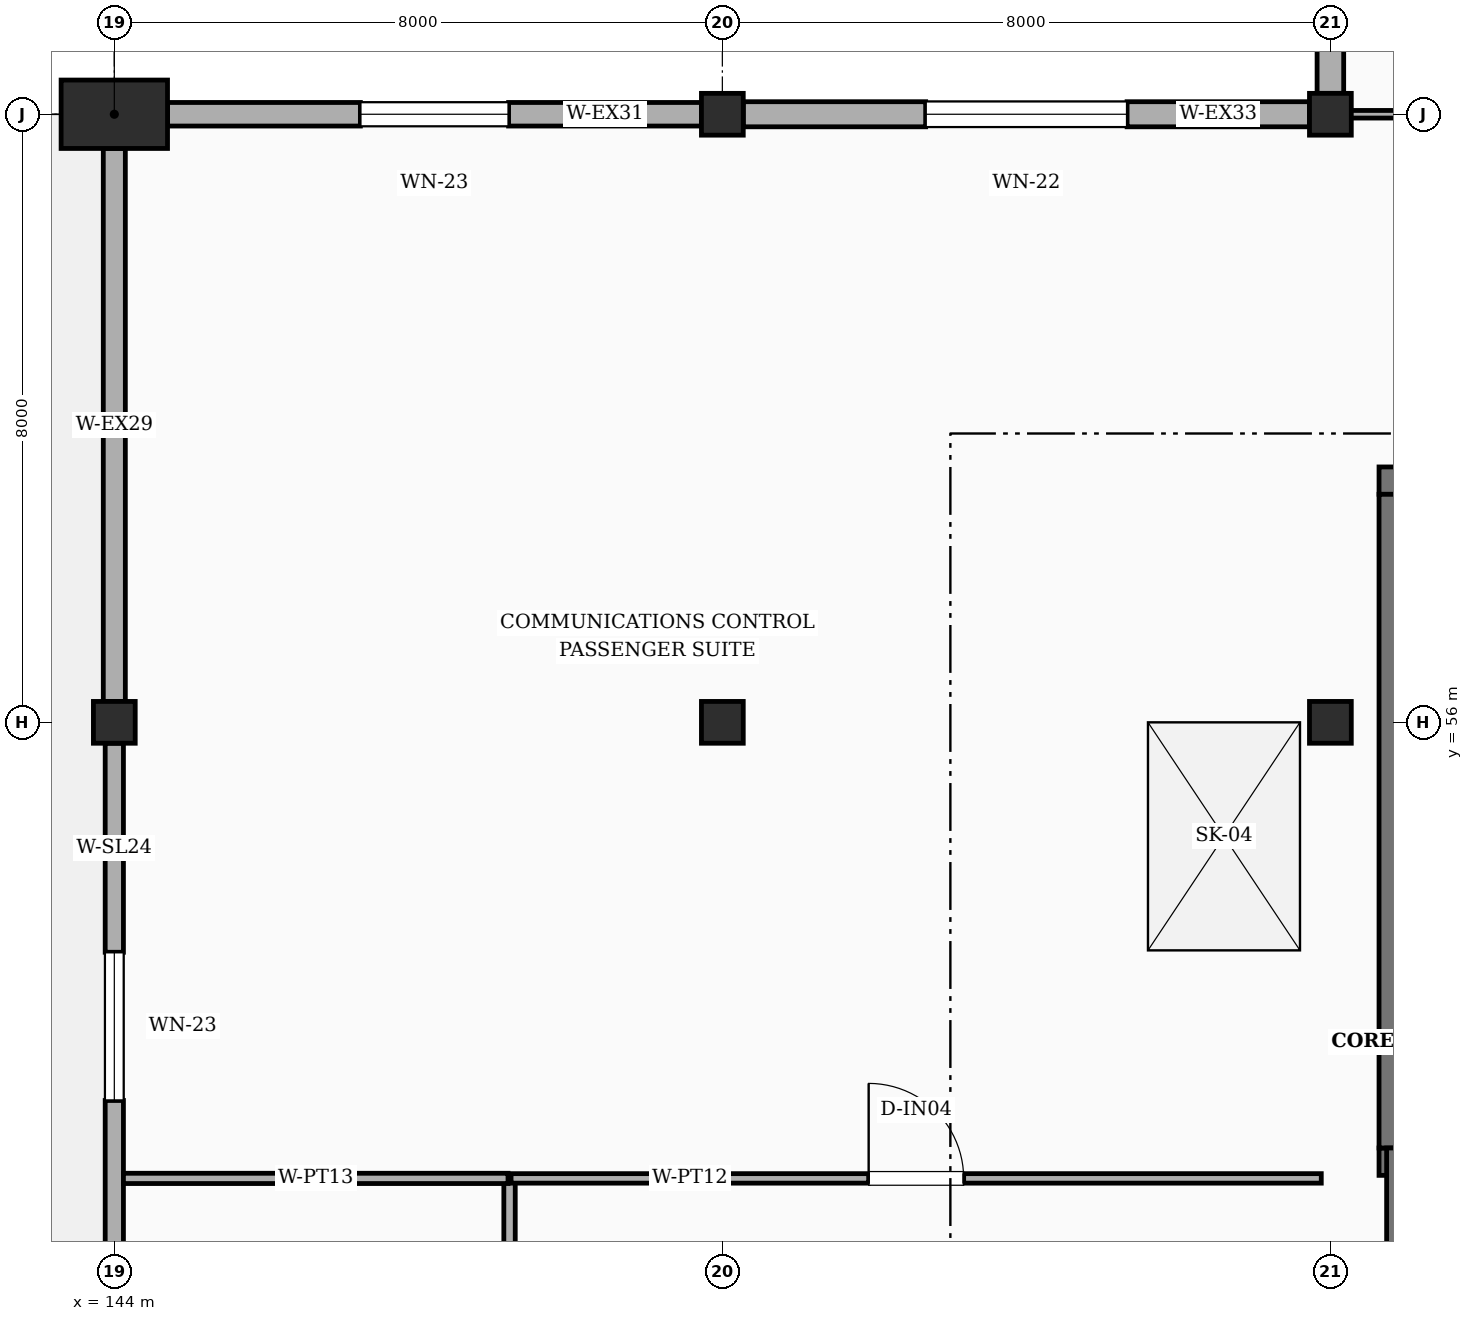
"""IFC4 building model, lengths in metres.
Left out: names, types, materials, properties, quantities, classifications, styles, units other than length and angle.
Written with IfcOpenShell. Run it as: python <this file> out.ifc"""

import sys

from ifc_helpers import new_model, si_unit, direction, frame, frame_2d, origin, origin_2d, place, context, subcontext, project, spatial, rectangle, extrude, element, fill, save


model = new_model("IFC4")
c1 = context("Model", 3, precision=1e-05, world=origin(), true_north=direction((0.0, 1.0)))
c2 = subcontext(c1, "Body", "Model", "MODEL_VIEW")
j1 = project(units=[si_unit("LENGTHUNIT", "METRE"), si_unit("PLANEANGLEUNIT", "RADIAN")], contexts=[c1])
p1 = place(None, origin())
s1 = spatial("IfcSite", under=j1, at=p1, CompositionType="ELEMENT")
p2 = place(p1, origin())
s2 = spatial("IfcBuilding", under=s1, at=p2, CompositionType="ELEMENT")
p3 = place(p2, frame((0.0, 0.0, 23.4)))
s3 = spatial("IfcBuildingStorey", under=s2, at=p3, CompositionType="ELEMENT", Elevation=23.4)
p4 = place(p3, frame((144.0, 64.0, 0.0), z_axis=(0.0, 0.0, 1.0), x_axis=(1.0, 0.0, 0.0)))
e1 = element("IfcColumn", 1, at=p4, inside=s3, PredefinedType="COLUMN", context=c2, shape_type="SweptSolid", body=[
    extrude(rectangle(XDim=1.4, YDim=0.9, at=origin_2d()), origin(), (0.0, 0.0, 1.0), 4.2),
])
for number, where, z_axis, x_axis in (
    (2, (144.0, 56.0, 0.0), (0.0, 0.0, 1.0), (1.0, 0.0, 0.0)),
    (3, (152.0, 56.0, 0.0), (0.0, 0.0, 1.0), (1.0, 0.0, 0.0)),
    (4, (152.0, 64.0, 0.0), (0.0, 0.0, 1.0), (1.0, 0.0, 0.0)),
    (5, (160.0, 56.0, 0.0), (0.0, 0.0, 1.0), (1.0, 0.0, 0.0)),
    (6, (160.0, 64.0, 0.0), (0.0, 0.0, 1.0), (1.0, 0.0, 0.0)),
):
    element("IfcColumn", number, at=place(p3, frame(where, z_axis=z_axis, x_axis=x_axis)), inside=s3, PredefinedType="COLUMN", context=c2, shape_type="SweptSolid", body=[
        extrude(rectangle(XDim=0.55, YDim=0.55, at=origin_2d()), origin(), (0.0, 0.0, 1.0), 4.2),
    ])
p5 = place(p3, frame((160.0, 71.725, 0.0), z_axis=(0.0, 0.0, 1.0), x_axis=(0.0, -1.0, 0.0)))
e7 = element("IfcWall", 7, at=p5, inside=s3, PredefinedType="STANDARD", context=c2, shape_type="SweptSolid", body=[
    extrude(rectangle(XDim=7.45, YDim=0.35, at=frame_2d((3.725, 0.0))), origin(), (0.0, 0.0, 1.0), 3.442),
])
p6 = place(p5, frame((2.75, 0.0, 0.95)))
e8 = element("IfcOpeningElement", 8, at=p6, cuts=e7, PredefinedType="OPENING", context=c2, shape_type="SweptSolid", body=[
    extrude(rectangle(XDim=1.95, YDim=1.95, at=frame_2d((0.975, 0.975))), frame((0.0, 0.185, 0.0), z_axis=(0.0, -1.0, 0.0), x_axis=(1.0, 0.0, 0.0)), (0.0, 0.0, 1.0), 0.37),
])
p7 = place(p3, frame((159.725, 64.0, 0.0), z_axis=(0.0, 0.0, 1.0), x_axis=(-1.0, 0.0, 0.0)))
e9 = element("IfcWall", 9, at=p7, inside=s3, PredefinedType="STANDARD", context=c2, shape_type="SweptSolid", body=[
    extrude(rectangle(XDim=7.45, YDim=0.33, at=frame_2d((3.725, 0.0))), origin(), (0.0, 0.0, 1.0), 3.97),
])
p8 = place(p7, frame((2.4, 0.0, 0.95)))
e10 = element("IfcOpeningElement", 10, at=p8, cuts=e9, PredefinedType="OPENING", context=c2, shape_type="SweptSolid", body=[
    extrude(rectangle(XDim=2.65, YDim=1.95, at=frame_2d((1.325, 0.975))), frame((0.0, 0.175, 0.0), z_axis=(0.0, -1.0, 0.0), x_axis=(1.0, 0.0, 0.0)), (0.0, 0.0, 1.0), 0.35),
])
p9 = place(p3, frame((151.725, 64.0, 0.0), z_axis=(0.0, 0.0, 1.0), x_axis=(-1.0, 0.0, 0.0)))
e11 = element("IfcWall", 11, at=p9, inside=s3, PredefinedType="STANDARD", context=c2, shape_type="SweptSolid", body=[
    extrude(rectangle(XDim=7.025, YDim=0.31, at=frame_2d((3.513, 0.0))), origin(), (0.0, 0.0, 1.0), 3.429),
])
p10 = place(p9, frame((2.538, 0.0, 0.95)))
e12 = element("IfcOpeningElement", 12, at=p10, cuts=e11, PredefinedType="OPENING", context=c2, shape_type="SweptSolid", body=[
    extrude(rectangle(XDim=1.95, YDim=1.95, at=frame_2d((0.975, 0.975))), frame((0.0, 0.165, 0.0), z_axis=(0.0, -1.0, 0.0), x_axis=(1.0, 0.0, 0.0)), (0.0, 0.0, 1.0), 0.33),
])
p11 = place(p3, frame((144.0, 63.55, 0.0), z_axis=(0.0, 0.0, 1.0), x_axis=(0.0, -1.0, 0.0)))
e13 = element("IfcWall", 13, at=p11, inside=s3, PredefinedType="STANDARD", context=c2, shape_type="SweptSolid", body=[
    extrude(rectangle(XDim=7.275, YDim=0.29, at=frame_2d((3.638, 0.0))), origin(), (0.0, 0.0, 1.0), 3.58),
])
p12 = place(p3, frame((144.0, 55.725, 0.0), z_axis=(0.0, 0.0, 1.0), x_axis=(0.0, -1.0, 0.0)))
e14 = element("IfcWall", 14, at=p12, inside=s3, PredefinedType="SOLIDWALL", context=c2, shape_type="SweptSolid", body=[
    extrude(rectangle(XDim=7.45, YDim=0.24, at=frame_2d((3.725, 0.0))), origin(), (0.0, 0.0, 1.0), 3.58),
])
p13 = place(p12, frame((2.75, 0.0, 0.95)))
e15 = element("IfcOpeningElement", 15, at=p13, cuts=e14, PredefinedType="OPENING", context=c2, shape_type="SweptSolid", body=[
    extrude(rectangle(XDim=1.95, YDim=1.95, at=frame_2d((0.975, 0.975))), frame((0.0, 0.13, 0.0), z_axis=(0.0, -1.0, 0.0), x_axis=(1.0, 0.0, 0.0)), (0.0, 0.0, 1.0), 0.26),
])
p14 = place(p3, frame((160.64, 50.22, 0.0), z_axis=(0.0, 0.0, 1.0), x_axis=(1.0, 0.0, 0.0)))
e16 = element("IfcWall", 16, at=p14, inside=s3, PredefinedType="SHEAR", context=c2, shape_type="SweptSolid", body=[
    extrude(rectangle(XDim=4.42, YDim=0.36, at=frame_2d((2.21, 0.0))), origin(), (0.0, 0.0, 1.0), 4.2),
])
p15 = place(p14, frame((1.685, 0.0, 0.0)))
e17 = element("IfcOpeningElement", 17, at=p15, cuts=e16, PredefinedType="OPENING", context=c2, shape_type="SweptSolid", body=[
    extrude(rectangle(XDim=1.05, YDim=2.15, at=frame_2d((0.525, 1.075))), frame((0.0, 0.19, 0.0), z_axis=(0.0, -1.0, 0.0), x_axis=(1.0, 0.0, 0.0)), (0.0, 0.0, 1.0), 0.38),
])
p16 = place(p3, frame((160.64, 59.18, 0.0), z_axis=(0.0, 0.0, 1.0), x_axis=(1.0, 0.0, 0.0)))
e18 = element("IfcWall", 18, at=p16, inside=s3, PredefinedType="SHEAR", context=c2, shape_type="SweptSolid", body=[
    extrude(rectangle(XDim=4.42, YDim=0.36, at=frame_2d((2.21, 0.0))), origin(), (0.0, 0.0, 1.0), 4.2),
])
p17 = place(p3, frame((160.82, 50.4, 0.0), z_axis=(0.0, 0.0, 1.0), x_axis=(0.0, 1.0, 0.0)))
e19 = element("IfcWall", 19, at=p17, inside=s3, PredefinedType="SHEAR", context=c2, shape_type="SweptSolid", body=[
    extrude(rectangle(XDim=8.6, YDim=0.36, at=frame_2d((4.3, 0.0))), origin(), (0.0, 0.0, 1.0), 4.2),
])
p18 = place(p3, frame((160.87, 46.54, 0.0), z_axis=(0.0, 0.0, 1.0), x_axis=(0.0, 1.0, 0.0)))
e20 = element("IfcWall", 20, at=p18, inside=s3, PredefinedType="SHEAR", context=c2, shape_type="SweptSolid", body=[
    extrude(rectangle(XDim=3.86, YDim=0.26, at=frame_2d((1.93, 0.0))), origin(), (0.0, 0.0, 1.0), 4.2),
])
p19 = place(p3, frame((149.2, 24.12, 0.0), z_axis=(0.0, 0.0, 1.0), x_axis=(0.0, 1.0, 0.0)))
e21 = element("IfcWall", 21, at=p19, inside=s3, PredefinedType="PARTITIONING", context=c2, shape_type="SweptSolid", body=[
    extrude(rectangle(XDim=25.86, YDim=0.15, at=frame_2d((12.93, 0.0))), origin(), (0.0, 0.0, 1.0), 3.429),
])
p20 = place(p19, frame((12.205, 0.0, 0.0)))
e22 = element("IfcOpeningElement", 22, at=p20, cuts=e21, PredefinedType="OPENING", context=c2, shape_type="SweptSolid", body=[
    extrude(rectangle(XDim=1.45, YDim=2.2, at=frame_2d((0.725, 1.1))), frame((0.0, 0.085, 0.0), z_axis=(0.0, -1.0, 0.0), x_axis=(1.0, 0.0, 0.0)), (0.0, 0.0, 1.0), 0.17),
])
p21 = place(p3, frame((144.12, 50.0, 0.0), z_axis=(0.0, 0.0, 1.0), x_axis=(1.0, 0.0, 0.0)))
e23 = element("IfcWall", 23, at=p21, inside=s3, PredefinedType="PARTITIONING", context=c2, shape_type="SweptSolid", body=[
    extrude(rectangle(XDim=5.06, YDim=0.135, at=frame_2d((2.53, 0.0))), origin(), (0.0, 0.0, 1.0), 3.58),
])
p22 = place(p3, frame((149.22, 50.0, 0.0), z_axis=(0.0, 0.0, 1.0), x_axis=(1.0, 0.0, 0.0)))
e24 = element("IfcWall", 24, at=p22, inside=s3, PredefinedType="PARTITIONING", context=c2, shape_type="SweptSolid", body=[
    extrude(rectangle(XDim=10.66, YDim=0.125, at=frame_2d((5.33, 0.0))), origin(), (0.0, 0.0, 1.0), 3.58),
])
p23 = place(p22, frame((4.705, 0.0, 0.0)))
e25 = element("IfcOpeningElement", 25, at=p23, cuts=e24, PredefinedType="OPENING", context=c2, shape_type="SweptSolid", body=[
    extrude(rectangle(XDim=1.25, YDim=2.15, at=frame_2d((0.625, 1.075))), frame((0.0, 0.073, 0.0), z_axis=(0.0, -1.0, 0.0), x_axis=(1.0, 0.0, 0.0)), (0.0, 0.0, 1.0), 0.145),
])
p24 = place(p3, frame((160.12, 64.0, 0.0), z_axis=(0.0, 0.0, 1.0), x_axis=(1.0, 0.0, 0.0)))
e26 = element("IfcWall", 26, at=p24, inside=s3, PredefinedType="PARTITIONING", context=c2, shape_type="SweptSolid", body=[
    extrude(rectangle(XDim=9.86, YDim=0.1, at=frame_2d((4.93, 0.0))), origin(), (0.0, 0.0, 1.0), 3.429),
])
p25 = place(p24, frame((4.205, 0.0, 0.0)))
e27 = element("IfcOpeningElement", 27, at=p25, cuts=e26, PredefinedType="OPENING", context=c2, shape_type="SweptSolid", body=[
    extrude(rectangle(XDim=1.45, YDim=2.2, at=frame_2d((0.725, 1.1))), frame((0.0, 0.06, 0.0), z_axis=(0.0, -1.0, 0.0), x_axis=(1.0, 0.0, 0.0)), (0.0, 0.0, 1.0), 0.12),
])
p26 = place(p8, origin())
e28 = element("IfcWindow", 28, at=p26, inside=s3, PartitioningType="SINGLE_PANEL", PredefinedType="WINDOW", context=c2, shape_type="SweptSolid", body=[
    extrude(rectangle(XDim=2.65, YDim=1.95, at=frame_2d((1.325, 0.975))), frame((0.0, 0.03, 0.0), z_axis=(0.0, -1.0, 0.0), x_axis=(1.0, 0.0, 0.0)), (0.0, 0.0, 1.0), 0.06),
])
fill(e10, e28)
p27 = place(p10, origin())
e29 = element("IfcWindow", 29, at=p27, inside=s3, PartitioningType="SINGLE_PANEL", PredefinedType="WINDOW", context=c2, shape_type="SweptSolid", body=[
    extrude(rectangle(XDim=1.95, YDim=1.95, at=frame_2d((0.975, 0.975))), frame((0.0, 0.03, 0.0), z_axis=(0.0, -1.0, 0.0), x_axis=(1.0, 0.0, 0.0)), (0.0, 0.0, 1.0), 0.06),
])
fill(e12, e29)
p28 = place(p13, origin())
e30 = element("IfcWindow", 30, at=p28, inside=s3, PartitioningType="SINGLE_PANEL", PredefinedType="WINDOW", context=c2, shape_type="SweptSolid", body=[
    extrude(rectangle(XDim=1.95, YDim=1.95, at=frame_2d((0.975, 0.975))), frame((0.0, 0.03, 0.0), z_axis=(0.0, -1.0, 0.0), x_axis=(1.0, 0.0, 0.0)), (0.0, 0.0, 1.0), 0.06),
])
fill(e15, e30)
p29 = place(p2, frame((0.0, 0.0, 27.6)))
p30 = place(p29, frame((0.0, 0.0, 1.925)))
p31 = place(p30, frame((158.6, 54.5, 0.0)))
p32 = place(p31, frame((0.0, 0.0, 0.175)))
e31 = element("IfcWindow", 31, at=p32, inside=s3, PartitioningType="SINGLE_PANEL", PredefinedType="SKYLIGHT", context=c2, shape_type="SweptSolid", body=[
    extrude(rectangle(XDim=2.0, YDim=3.0, at=origin_2d()), origin(), (0.0, 0.0, 1.0), 0.05),
])
p33 = place(p23, origin())
e32 = element("IfcDoor", 32, at=p33, inside=s3, OperationType="SINGLE_SWING_LEFT", PredefinedType="DOOR", context=c2, shape_type="SweptSolid", body=[
    extrude(rectangle(XDim=1.25, YDim=2.15, at=frame_2d((0.625, 1.075))), frame((0.0, 0.025, 0.0), z_axis=(0.0, -1.0, 0.0), x_axis=(1.0, 0.0, 0.0)), (0.0, 0.0, 1.0), 0.05),
])
fill(e25, e32)
save(model, sys.argv[1])
